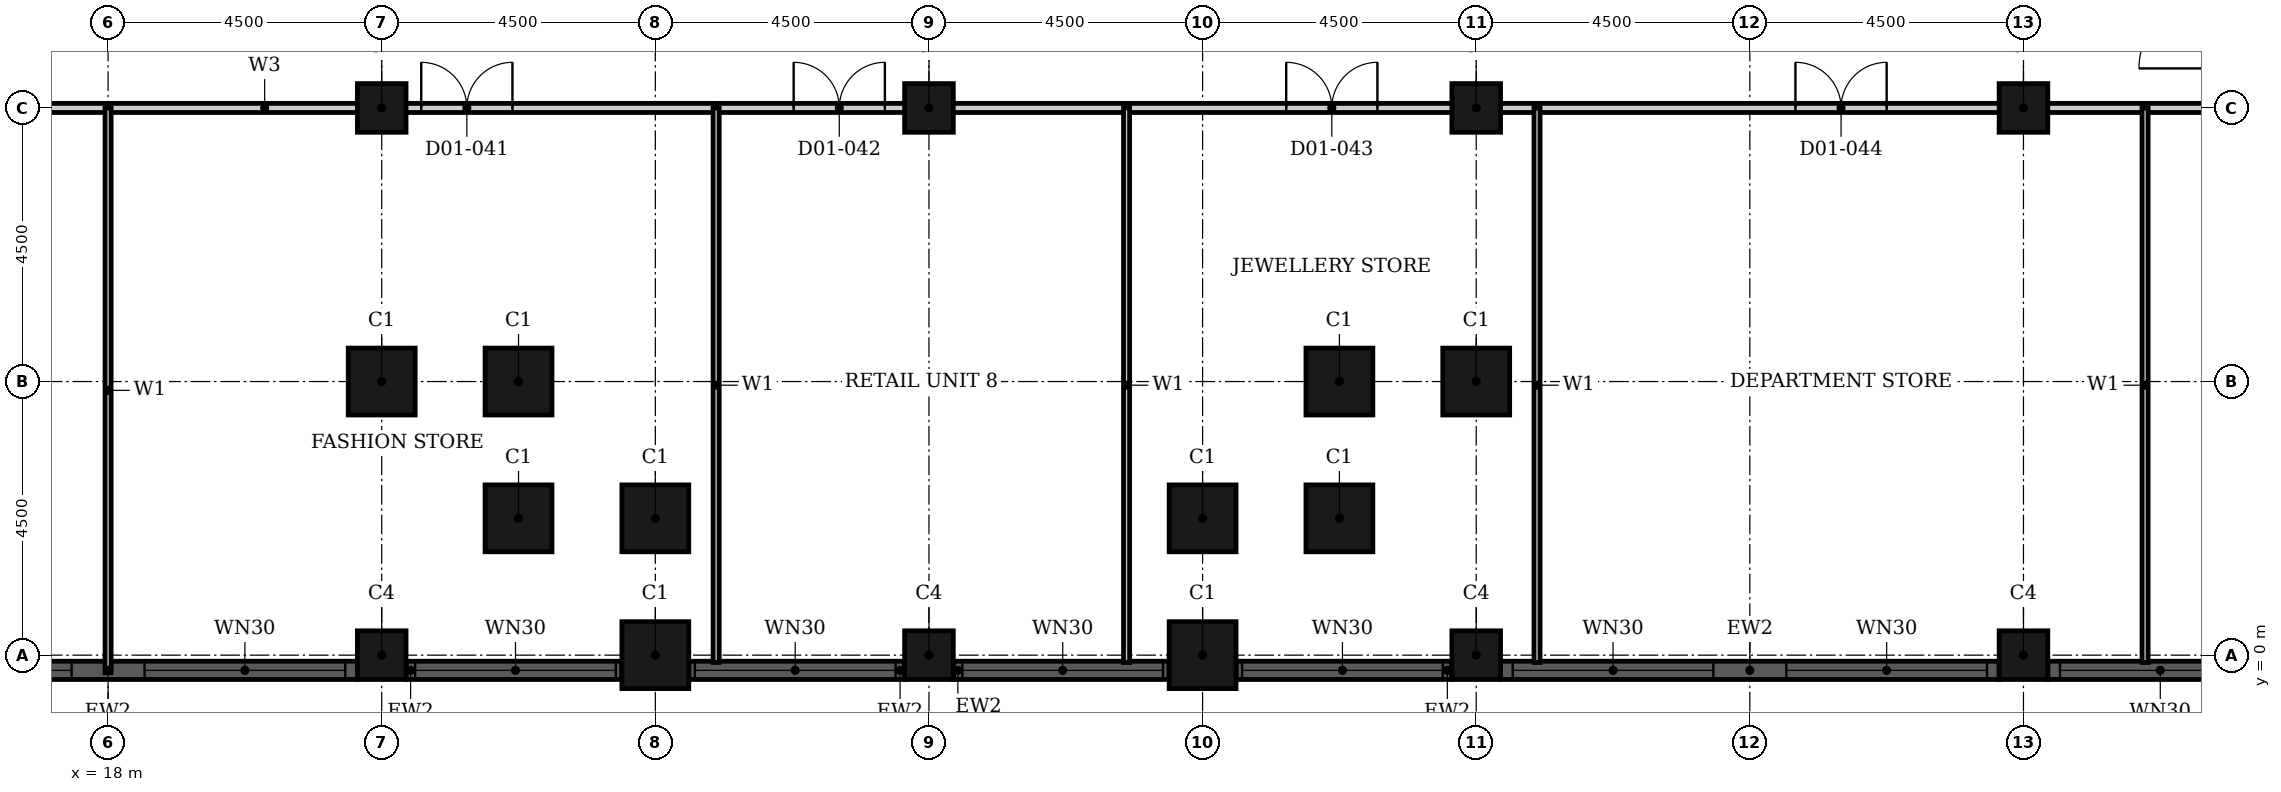
"""IFC4 building model, lengths in metres.
Left out: names, types, materials, properties, quantities, classifications, styles, units other than length and angle.
Written with IfcOpenShell. Run it as: python <this file> out.ifc"""

import sys

from ifc_helpers import new_model, si_unit, direction, frame, frame_2d, origin, origin_2d, place, context, subcontext, project, spatial, rectangle, hollow_rectangle, extrude, element, fill, save


model = new_model("IFC4")
c1 = context("Model", 3, precision=1e-05, world=origin(), true_north=direction((0.0, 1.0)))
c2 = subcontext(c1, "Body", "Model", "MODEL_VIEW")
j1 = project(units=[si_unit("LENGTHUNIT", "METRE"), si_unit("PLANEANGLEUNIT", "RADIAN")], contexts=[c1])
p1 = place(None, origin())
s1 = spatial("IfcSite", under=j1, at=p1, CompositionType="ELEMENT")
p2 = place(p1, origin())
s2 = spatial("IfcBuilding", under=s1, at=p2, CompositionType="ELEMENT")
p3 = place(p2, frame((0.0, 0.0, 6.6)))
s3 = spatial("IfcBuildingStorey", under=s2, at=p3, CompositionType="ELEMENT", Elevation=6.6)
for number, where, z_axis, x_axis in (
    (1, (22.5, 4.5, 0.0), (0.0, 0.0, 1.0), (1.0, 0.0, 0.0)),
    (2, (24.75, 4.5, 0.0), (0.0, 0.0, 1.0), (1.0, 0.0, 0.0)),
    (3, (24.75, 2.25, 0.0), (0.0, 0.0, 1.0), (1.0, 0.0, 0.0)),
    (4, (27.0, 2.25, 0.0), (0.0, 0.0, 1.0), (1.0, 0.0, 0.0)),
    (5, (27.0, 0.0, 0.0), (0.0, 0.0, 1.0), (1.0, 0.0, 0.0)),
    (6, (36.0, 0.0, 0.0), (0.0, 0.0, 1.0), (1.0, 0.0, 0.0)),
    (7, (36.0, 2.25, 0.0), (0.0, 0.0, 1.0), (1.0, 0.0, 0.0)),
    (8, (38.25, 2.25, 0.0), (0.0, 0.0, 1.0), (1.0, 0.0, 0.0)),
    (9, (38.25, 4.5, 0.0), (0.0, 0.0, 1.0), (1.0, 0.0, 0.0)),
    (10, (40.5, 4.5, 0.0), (0.0, 0.0, 1.0), (1.0, 0.0, 0.0)),
):
    element("IfcColumn", number, at=place(p3, frame(where, z_axis=z_axis, x_axis=x_axis)), inside=s3, PredefinedType="COLUMN", context=c2, shape_type="SweptSolid", body=[
        extrude(hollow_rectangle(XDim=1.1, YDim=1.1, WallThickness=0.036, at=origin_2d()), origin(), (0.0, 0.0, 1.0), 5.4),
    ])
for number, where, z_axis, x_axis in (
    (11, (22.5, 0.0, 0.0), (0.0, 0.0, 1.0), (1.0, 0.0, 0.0)),
    (12, (31.5, 0.0, 0.0), (0.0, 0.0, 1.0), (1.0, 0.0, 0.0)),
    (13, (40.5, 0.0, 0.0), (0.0, 0.0, 1.0), (1.0, 0.0, 0.0)),
    (14, (49.5, 0.0, 0.0), (0.0, 0.0, 1.0), (1.0, 0.0, 0.0)),
    (15, (22.5, 9.0, 0.0), (0.0, 0.0, 1.0), (1.0, 0.0, 0.0)),
    (16, (31.5, 9.0, 0.0), (0.0, 0.0, 1.0), (1.0, 0.0, 0.0)),
    (17, (40.5, 9.0, 0.0), (0.0, 0.0, 1.0), (1.0, 0.0, 0.0)),
    (18, (49.5, 9.0, 0.0), (0.0, 0.0, 1.0), (1.0, 0.0, 0.0)),
):
    element("IfcColumn", number, at=place(p3, frame(where, z_axis=z_axis, x_axis=x_axis)), inside=s3, PredefinedType="COLUMN", context=c2, shape_type="SweptSolid", body=[
        extrude(hollow_rectangle(XDim=0.8, YDim=0.8, WallThickness=0.025, at=origin_2d()), origin(), (0.0, 0.0, 1.0), 5.4),
    ])
p4 = place(p3, frame((13.9, -0.25, 0.0), z_axis=(0.0, 0.0, 1.0), x_axis=(1.0, 0.0, 0.0)))
e19 = element("IfcWall", 19, at=p4, inside=s3, PredefinedType="SOLIDWALL", context=c2, shape_type="SweptSolid", body=[
    extrude(rectangle(XDim=8.2, YDim=0.3, at=frame_2d((4.1, 0.0))), origin(), (0.0, 0.0, 1.0), 5.4),
])
p5 = place(p4, frame((0.2, 0.0, 0.9)))
e20 = element("IfcOpeningElement", 20, at=p5, cuts=e19, PredefinedType="OPENING", context=c2, shape_type="SweptSolid", body=[
    extrude(rectangle(XDim=3.3, YDim=3.5, at=frame_2d((1.65, 1.75))), frame((0.0, 0.16, 0.0), z_axis=(0.0, -1.0, 0.0), x_axis=(1.0, 0.0, 0.0)), (0.0, 0.0, 1.0), 0.32),
])
p6 = place(p4, frame((4.7, 0.0, 0.9)))
e21 = element("IfcOpeningElement", 21, at=p6, cuts=e19, PredefinedType="OPENING", context=c2, shape_type="SweptSolid", body=[
    extrude(rectangle(XDim=3.3, YDim=3.5, at=frame_2d((1.65, 1.75))), frame((0.0, 0.16, 0.0), z_axis=(0.0, -1.0, 0.0), x_axis=(1.0, 0.0, 0.0)), (0.0, 0.0, 1.0), 0.32),
])
p7 = place(p3, frame((22.9, -0.25, 0.0), z_axis=(0.0, 0.0, 1.0), x_axis=(1.0, 0.0, 0.0)))
e22 = element("IfcWall", 22, at=p7, inside=s3, PredefinedType="SOLIDWALL", context=c2, shape_type="SweptSolid", body=[
    extrude(rectangle(XDim=3.55, YDim=0.3, at=frame_2d((1.775, 0.0))), origin(), (0.0, 0.0, 1.0), 5.4),
])
p8 = place(p7, frame((0.15, 0.0, 0.9)))
e23 = element("IfcOpeningElement", 23, at=p8, cuts=e22, PredefinedType="OPENING", context=c2, shape_type="SweptSolid", body=[
    extrude(rectangle(XDim=3.3, YDim=3.5, at=frame_2d((1.65, 1.75))), frame((0.0, 0.16, 0.0), z_axis=(0.0, -1.0, 0.0), x_axis=(1.0, 0.0, 0.0)), (0.0, 0.0, 1.0), 0.32),
])
p9 = place(p3, frame((27.55, -0.25, 0.0), z_axis=(0.0, 0.0, 1.0), x_axis=(1.0, 0.0, 0.0)))
e24 = element("IfcWall", 24, at=p9, inside=s3, PredefinedType="SOLIDWALL", context=c2, shape_type="SweptSolid", body=[
    extrude(rectangle(XDim=3.55, YDim=0.3, at=frame_2d((1.775, 0.0))), origin(), (0.0, 0.0, 1.0), 5.4),
])
p10 = place(p9, frame((0.1, 0.0, 0.9)))
e25 = element("IfcOpeningElement", 25, at=p10, cuts=e24, PredefinedType="OPENING", context=c2, shape_type="SweptSolid", body=[
    extrude(rectangle(XDim=3.3, YDim=3.5, at=frame_2d((1.65, 1.75))), frame((0.0, 0.16, 0.0), z_axis=(0.0, -1.0, 0.0), x_axis=(1.0, 0.0, 0.0)), (0.0, 0.0, 1.0), 0.32),
])
p11 = place(p3, frame((31.9, -0.25, 0.0), z_axis=(0.0, 0.0, 1.0), x_axis=(1.0, 0.0, 0.0)))
e26 = element("IfcWall", 26, at=p11, inside=s3, PredefinedType="SOLIDWALL", context=c2, shape_type="SweptSolid", body=[
    extrude(rectangle(XDim=3.55, YDim=0.3, at=frame_2d((1.775, 0.0))), origin(), (0.0, 0.0, 1.0), 5.4),
])
p12 = place(p11, frame((0.15, 0.0, 0.9)))
e27 = element("IfcOpeningElement", 27, at=p12, cuts=e26, PredefinedType="OPENING", context=c2, shape_type="SweptSolid", body=[
    extrude(rectangle(XDim=3.3, YDim=3.5, at=frame_2d((1.65, 1.75))), frame((0.0, 0.16, 0.0), z_axis=(0.0, -1.0, 0.0), x_axis=(1.0, 0.0, 0.0)), (0.0, 0.0, 1.0), 0.32),
])
p13 = place(p3, frame((36.55, -0.25, 0.0), z_axis=(0.0, 0.0, 1.0), x_axis=(1.0, 0.0, 0.0)))
e28 = element("IfcWall", 28, at=p13, inside=s3, PredefinedType="SOLIDWALL", context=c2, shape_type="SweptSolid", body=[
    extrude(rectangle(XDim=3.55, YDim=0.3, at=frame_2d((1.775, 0.0))), origin(), (0.0, 0.0, 1.0), 5.4),
])
p14 = place(p13, frame((0.1, 0.0, 0.9)))
e29 = element("IfcOpeningElement", 29, at=p14, cuts=e28, PredefinedType="OPENING", context=c2, shape_type="SweptSolid", body=[
    extrude(rectangle(XDim=3.3, YDim=3.5, at=frame_2d((1.65, 1.75))), frame((0.0, 0.16, 0.0), z_axis=(0.0, -1.0, 0.0), x_axis=(1.0, 0.0, 0.0)), (0.0, 0.0, 1.0), 0.32),
])
p15 = place(p3, frame((40.9, -0.25, 0.0), z_axis=(0.0, 0.0, 1.0), x_axis=(1.0, 0.0, 0.0)))
e30 = element("IfcWall", 30, at=p15, inside=s3, PredefinedType="SOLIDWALL", context=c2, shape_type="SweptSolid", body=[
    extrude(rectangle(XDim=8.2, YDim=0.3, at=frame_2d((4.1, 0.0))), origin(), (0.0, 0.0, 1.0), 5.4),
])
p16 = place(p15, frame((0.2, 0.0, 0.9)))
e31 = element("IfcOpeningElement", 31, at=p16, cuts=e30, PredefinedType="OPENING", context=c2, shape_type="SweptSolid", body=[
    extrude(rectangle(XDim=3.3, YDim=3.5, at=frame_2d((1.65, 1.75))), frame((0.0, 0.16, 0.0), z_axis=(0.0, -1.0, 0.0), x_axis=(1.0, 0.0, 0.0)), (0.0, 0.0, 1.0), 0.32),
])
p17 = place(p15, frame((4.7, 0.0, 0.9)))
e32 = element("IfcOpeningElement", 32, at=p17, cuts=e30, PredefinedType="OPENING", context=c2, shape_type="SweptSolid", body=[
    extrude(rectangle(XDim=3.3, YDim=3.5, at=frame_2d((1.65, 1.75))), frame((0.0, 0.16, 0.0), z_axis=(0.0, -1.0, 0.0), x_axis=(1.0, 0.0, 0.0)), (0.0, 0.0, 1.0), 0.32),
])
p18 = place(p3, frame((49.9, -0.25, 0.0), z_axis=(0.0, 0.0, 1.0), x_axis=(1.0, 0.0, 0.0)))
e33 = element("IfcWall", 33, at=p18, inside=s3, PredefinedType="SOLIDWALL", context=c2, shape_type="SweptSolid", body=[
    extrude(rectangle(XDim=8.2, YDim=0.3, at=frame_2d((4.1, 0.0))), origin(), (0.0, 0.0, 1.0), 5.4),
])
p19 = place(p18, frame((0.2, 0.0, 0.9)))
e34 = element("IfcOpeningElement", 34, at=p19, cuts=e33, PredefinedType="OPENING", context=c2, shape_type="SweptSolid", body=[
    extrude(rectangle(XDim=3.3, YDim=3.5, at=frame_2d((1.65, 1.75))), frame((0.0, 0.16, 0.0), z_axis=(0.0, -1.0, 0.0), x_axis=(1.0, 0.0, 0.0)), (0.0, 0.0, 1.0), 0.32),
])
p20 = place(p18, frame((4.7, 0.0, 0.9)))
e35 = element("IfcOpeningElement", 35, at=p20, cuts=e33, PredefinedType="OPENING", context=c2, shape_type="SweptSolid", body=[
    extrude(rectangle(XDim=3.3, YDim=3.5, at=frame_2d((1.65, 1.75))), frame((0.0, 0.16, 0.0), z_axis=(0.0, -1.0, 0.0), x_axis=(1.0, 0.0, 0.0)), (0.0, 0.0, 1.0), 0.32),
])
p21 = place(p3, frame((11.25, 9.0, 0.0), z_axis=(0.0, 0.0, 1.0), x_axis=(1.0, 0.0, 0.0)))
e36 = element("IfcWall", 36, at=p21, inside=s3, PredefinedType="PARTITIONING", context=c2, shape_type="SweptSolid", body=[
    extrude(rectangle(XDim=6.75, YDim=0.15, at=frame_2d((3.375, 0.0))), origin(), (0.0, 0.0, 1.0), 5.05),
])
p22 = place(p21, frame((3.075, 0.0, 0.0)))
e37 = element("IfcOpeningElement", 37, at=p22, cuts=e36, PredefinedType="OPENING", context=c2, shape_type="SweptSolid", body=[
    extrude(rectangle(XDim=1.5, YDim=2.4, at=frame_2d((0.75, 1.2))), frame((0.0, 0.085, 0.0), z_axis=(0.0, -1.0, 0.0), x_axis=(1.0, 0.0, 0.0)), (0.0, 0.0, 1.0), 0.17),
])
p23 = place(p3, frame((18.0, 9.0, 0.0), z_axis=(0.0, 0.0, 1.0), x_axis=(1.0, 0.0, 0.0)))
e38 = element("IfcWall", 38, at=p23, inside=s3, PredefinedType="PARTITIONING", context=c2, shape_type="SweptSolid", body=[
    extrude(rectangle(XDim=10.0, YDim=0.15, at=frame_2d((5.0, 0.0))), origin(), (0.0, 0.0, 1.0), 5.05),
])
p24 = place(p23, frame((5.15, 0.0, 0.0)))
e39 = element("IfcOpeningElement", 39, at=p24, cuts=e38, PredefinedType="OPENING", context=c2, shape_type="SweptSolid", body=[
    extrude(rectangle(XDim=1.5, YDim=2.4, at=frame_2d((0.75, 1.2))), frame((0.0, 0.085, 0.0), z_axis=(0.0, -1.0, 0.0), x_axis=(1.0, 0.0, 0.0)), (0.0, 0.0, 1.0), 0.17),
])
p25 = place(p3, frame((28.0, 9.0, 0.0), z_axis=(0.0, 0.0, 1.0), x_axis=(1.0, 0.0, 0.0)))
e40 = element("IfcWall", 40, at=p25, inside=s3, PredefinedType="PARTITIONING", context=c2, shape_type="SweptSolid", body=[
    extrude(rectangle(XDim=6.75, YDim=0.15, at=frame_2d((3.375, 0.0))), origin(), (0.0, 0.0, 1.0), 5.05),
])
p26 = place(p25, frame((1.275, 0.0, 0.0)))
e41 = element("IfcOpeningElement", 41, at=p26, cuts=e40, PredefinedType="OPENING", context=c2, shape_type="SweptSolid", body=[
    extrude(rectangle(XDim=1.5, YDim=2.4, at=frame_2d((0.75, 1.2))), frame((0.0, 0.085, 0.0), z_axis=(0.0, -1.0, 0.0), x_axis=(1.0, 0.0, 0.0)), (0.0, 0.0, 1.0), 0.17),
])
p27 = place(p3, frame((34.75, 9.0, 0.0), z_axis=(0.0, 0.0, 1.0), x_axis=(1.0, 0.0, 0.0)))
e42 = element("IfcWall", 42, at=p27, inside=s3, PredefinedType="PARTITIONING", context=c2, shape_type="SweptSolid", body=[
    extrude(rectangle(XDim=6.75, YDim=0.15, at=frame_2d((3.375, 0.0))), origin(), (0.0, 0.0, 1.0), 5.05),
])
p28 = place(p27, frame((2.625, 0.0, 0.0)))
e43 = element("IfcOpeningElement", 43, at=p28, cuts=e42, PredefinedType="OPENING", context=c2, shape_type="SweptSolid", body=[
    extrude(rectangle(XDim=1.5, YDim=2.4, at=frame_2d((0.75, 1.2))), frame((0.0, 0.085, 0.0), z_axis=(0.0, -1.0, 0.0), x_axis=(1.0, 0.0, 0.0)), (0.0, 0.0, 1.0), 0.17),
])
p29 = place(p3, frame((41.5, 9.0, 0.0), z_axis=(0.0, 0.0, 1.0), x_axis=(1.0, 0.0, 0.0)))
e44 = element("IfcWall", 44, at=p29, inside=s3, PredefinedType="PARTITIONING", context=c2, shape_type="SweptSolid", body=[
    extrude(rectangle(XDim=10.0, YDim=0.15, at=frame_2d((5.0, 0.0))), origin(), (0.0, 0.0, 1.0), 5.05),
])
p30 = place(p29, frame((4.25, 0.0, 0.0)))
e45 = element("IfcOpeningElement", 45, at=p30, cuts=e44, PredefinedType="OPENING", context=c2, shape_type="SweptSolid", body=[
    extrude(rectangle(XDim=1.5, YDim=2.4, at=frame_2d((0.75, 1.2))), frame((0.0, 0.085, 0.0), z_axis=(0.0, -1.0, 0.0), x_axis=(1.0, 0.0, 0.0)), (0.0, 0.0, 1.0), 0.17),
])
p31 = place(p3, frame((51.5, 9.0, 0.0), z_axis=(0.0, 0.0, 1.0), x_axis=(1.0, 0.0, 0.0)))
e46 = element("IfcWall", 46, at=p31, inside=s3, PredefinedType="PARTITIONING", context=c2, shape_type="SweptSolid", body=[
    extrude(rectangle(XDim=1.1, YDim=0.15, at=frame_2d((0.55, 0.0))), origin(), (0.0, 0.0, 1.0), 5.05),
])
p32 = place(p3, frame((18.0, -0.29, 0.0), z_axis=(0.0, 0.0, 1.0), x_axis=(0.0, 1.0, 0.0)))
e47 = element("IfcWall", 47, at=p32, inside=s3, PredefinedType="PARTITIONING", context=c2, shape_type="SweptSolid", body=[
    extrude(rectangle(XDim=9.29, YDim=0.1, at=frame_2d((4.645, 0.0))), origin(), (0.0, 0.0, 1.0), 5.05),
])
for number, where, z_axis, x_axis in (
    (48, (28.0, -0.12, 0.0), (0.0, 0.0, 1.0), (0.0, 1.0, 0.0)),
    (49, (34.75, -0.12, 0.0), (0.0, 0.0, 1.0), (0.0, 1.0, 0.0)),
    (50, (41.5, -0.12, 0.0), (0.0, 0.0, 1.0), (0.0, 1.0, 0.0)),
    (51, (51.5, -0.12, 0.0), (0.0, 0.0, 1.0), (0.0, 1.0, 0.0)),
):
    element("IfcWall", number, at=place(p3, frame(where, z_axis=z_axis, x_axis=x_axis)), inside=s3, PredefinedType="PARTITIONING", context=c2, shape_type="SweptSolid", body=[
        extrude(rectangle(XDim=9.12, YDim=0.1, at=frame_2d((4.56, 0.0))), origin(), (0.0, 0.0, 1.0), 5.05),
    ])
p33 = place(p5, origin())
e52 = element("IfcWindow", 52, at=p33, inside=s3, PartitioningType="SINGLE_PANEL", PredefinedType="WINDOW", context=c2, shape_type="SweptSolid", body=[
    extrude(rectangle(XDim=3.3, YDim=3.5, at=frame_2d((1.65, 1.75))), frame((0.0, 0.03, 0.0), z_axis=(0.0, -1.0, 0.0), x_axis=(1.0, 0.0, 0.0)), (0.0, 0.0, 1.0), 0.06),
])
fill(e20, e52)
p34 = place(p6, origin())
e53 = element("IfcWindow", 53, at=p34, inside=s3, PartitioningType="SINGLE_PANEL", PredefinedType="WINDOW", context=c2, shape_type="SweptSolid", body=[
    extrude(rectangle(XDim=3.3, YDim=3.5, at=frame_2d((1.65, 1.75))), frame((0.0, 0.03, 0.0), z_axis=(0.0, -1.0, 0.0), x_axis=(1.0, 0.0, 0.0)), (0.0, 0.0, 1.0), 0.06),
])
fill(e21, e53)
p35 = place(p8, origin())
e54 = element("IfcWindow", 54, at=p35, inside=s3, PartitioningType="SINGLE_PANEL", PredefinedType="WINDOW", context=c2, shape_type="SweptSolid", body=[
    extrude(rectangle(XDim=3.3, YDim=3.5, at=frame_2d((1.65, 1.75))), frame((0.0, 0.03, 0.0), z_axis=(0.0, -1.0, 0.0), x_axis=(1.0, 0.0, 0.0)), (0.0, 0.0, 1.0), 0.06),
])
fill(e23, e54)
p36 = place(p10, origin())
e55 = element("IfcWindow", 55, at=p36, inside=s3, PartitioningType="SINGLE_PANEL", PredefinedType="WINDOW", context=c2, shape_type="SweptSolid", body=[
    extrude(rectangle(XDim=3.3, YDim=3.5, at=frame_2d((1.65, 1.75))), frame((0.0, 0.03, 0.0), z_axis=(0.0, -1.0, 0.0), x_axis=(1.0, 0.0, 0.0)), (0.0, 0.0, 1.0), 0.06),
])
fill(e25, e55)
p37 = place(p12, origin())
e56 = element("IfcWindow", 56, at=p37, inside=s3, PartitioningType="SINGLE_PANEL", PredefinedType="WINDOW", context=c2, shape_type="SweptSolid", body=[
    extrude(rectangle(XDim=3.3, YDim=3.5, at=frame_2d((1.65, 1.75))), frame((0.0, 0.03, 0.0), z_axis=(0.0, -1.0, 0.0), x_axis=(1.0, 0.0, 0.0)), (0.0, 0.0, 1.0), 0.06),
])
fill(e27, e56)
p38 = place(p14, origin())
e57 = element("IfcWindow", 57, at=p38, inside=s3, PartitioningType="SINGLE_PANEL", PredefinedType="WINDOW", context=c2, shape_type="SweptSolid", body=[
    extrude(rectangle(XDim=3.3, YDim=3.5, at=frame_2d((1.65, 1.75))), frame((0.0, 0.03, 0.0), z_axis=(0.0, -1.0, 0.0), x_axis=(1.0, 0.0, 0.0)), (0.0, 0.0, 1.0), 0.06),
])
fill(e29, e57)
p39 = place(p16, origin())
e58 = element("IfcWindow", 58, at=p39, inside=s3, PartitioningType="SINGLE_PANEL", PredefinedType="WINDOW", context=c2, shape_type="SweptSolid", body=[
    extrude(rectangle(XDim=3.3, YDim=3.5, at=frame_2d((1.65, 1.75))), frame((0.0, 0.03, 0.0), z_axis=(0.0, -1.0, 0.0), x_axis=(1.0, 0.0, 0.0)), (0.0, 0.0, 1.0), 0.06),
])
fill(e31, e58)
p40 = place(p17, origin())
e59 = element("IfcWindow", 59, at=p40, inside=s3, PartitioningType="SINGLE_PANEL", PredefinedType="WINDOW", context=c2, shape_type="SweptSolid", body=[
    extrude(rectangle(XDim=3.3, YDim=3.5, at=frame_2d((1.65, 1.75))), frame((0.0, 0.03, 0.0), z_axis=(0.0, -1.0, 0.0), x_axis=(1.0, 0.0, 0.0)), (0.0, 0.0, 1.0), 0.06),
])
fill(e32, e59)
p41 = place(p19, origin())
e60 = element("IfcWindow", 60, at=p41, inside=s3, PartitioningType="SINGLE_PANEL", PredefinedType="WINDOW", context=c2, shape_type="SweptSolid", body=[
    extrude(rectangle(XDim=3.3, YDim=3.5, at=frame_2d((1.65, 1.75))), frame((0.0, 0.03, 0.0), z_axis=(0.0, -1.0, 0.0), x_axis=(1.0, 0.0, 0.0)), (0.0, 0.0, 1.0), 0.06),
])
fill(e34, e60)
p42 = place(p24, origin())
e61 = element("IfcDoor", 61, at=p42, inside=s3, OperationType="DOUBLE_DOOR_SINGLE_SWING", PredefinedType="DOOR", context=c2, shape_type="SweptSolid", body=[
    extrude(rectangle(XDim=1.5, YDim=2.4, at=frame_2d((0.75, 1.2))), frame((0.0, 0.025, 0.0), z_axis=(0.0, -1.0, 0.0), x_axis=(1.0, 0.0, 0.0)), (0.0, 0.0, 1.0), 0.05),
])
fill(e39, e61)
p43 = place(p26, origin())
e62 = element("IfcDoor", 62, at=p43, inside=s3, OperationType="DOUBLE_DOOR_SINGLE_SWING", PredefinedType="DOOR", context=c2, shape_type="SweptSolid", body=[
    extrude(rectangle(XDim=1.5, YDim=2.4, at=frame_2d((0.75, 1.2))), frame((0.0, 0.025, 0.0), z_axis=(0.0, -1.0, 0.0), x_axis=(1.0, 0.0, 0.0)), (0.0, 0.0, 1.0), 0.05),
])
fill(e41, e62)
p44 = place(p28, origin())
e63 = element("IfcDoor", 63, at=p44, inside=s3, OperationType="DOUBLE_DOOR_SINGLE_SWING", PredefinedType="DOOR", context=c2, shape_type="SweptSolid", body=[
    extrude(rectangle(XDim=1.5, YDim=2.4, at=frame_2d((0.75, 1.2))), frame((0.0, 0.025, 0.0), z_axis=(0.0, -1.0, 0.0), x_axis=(1.0, 0.0, 0.0)), (0.0, 0.0, 1.0), 0.05),
])
fill(e43, e63)
p45 = place(p30, origin())
e64 = element("IfcDoor", 64, at=p45, inside=s3, OperationType="DOUBLE_DOOR_SINGLE_SWING", PredefinedType="DOOR", context=c2, shape_type="SweptSolid", body=[
    extrude(rectangle(XDim=1.5, YDim=2.4, at=frame_2d((0.75, 1.2))), frame((0.0, 0.025, 0.0), z_axis=(0.0, -1.0, 0.0), x_axis=(1.0, 0.0, 0.0)), (0.0, 0.0, 1.0), 0.05),
])
fill(e45, e64)
save(model, sys.argv[1])
